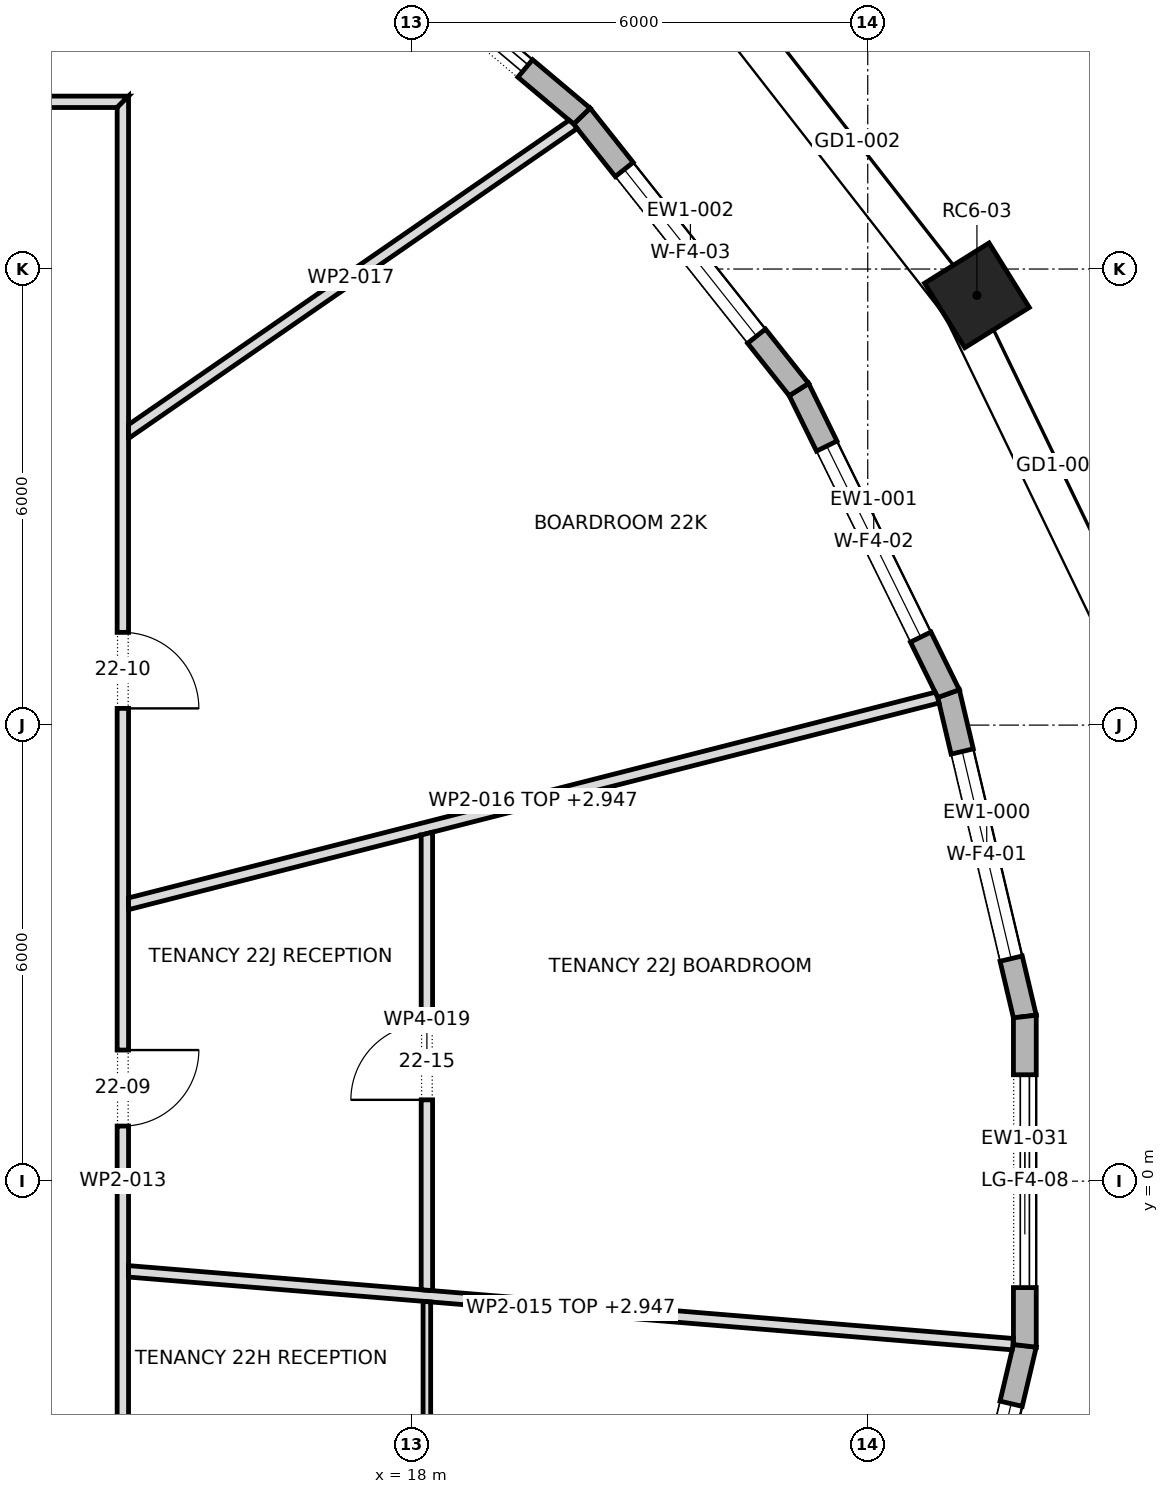
"""IFC4 building model, lengths in metres.
Left out: names, types, materials, properties, quantities, classifications, styles, units other than length and angle.
Written with IfcOpenShell. Run it as: python <this file> out.ifc"""

import sys

from ifc_helpers import new_model, si_unit, direction, frame, frame_2d, origin, origin_2d, place, context, subcontext, project, spatial, polyline, rectangle, outline, extrude, element, fill, save


model = new_model("IFC4")
c1 = context("Model", 3, precision=1e-05, world=origin(), true_north=direction((0.0, 1.0)))
c2 = subcontext(c1, "Body", "Model", "MODEL_VIEW")
j1 = project(units=[si_unit("LENGTHUNIT", "METRE"), si_unit("PLANEANGLEUNIT", "RADIAN")], contexts=[c1])
p1 = place(None, origin())
s1 = spatial("IfcSite", under=j1, at=p1, CompositionType="ELEMENT")
p2 = place(p1, origin())
s2 = spatial("IfcBuilding", under=s1, at=p2, CompositionType="ELEMENT")
p3 = place(p2, frame((0.0, 0.0, 304.3)))
s3 = spatial("IfcBuildingStorey", under=s2, at=p3, CompositionType="ELEMENT", Elevation=304.3)
p4 = place(p3, frame((25.437, 11.654, 0.0), z_axis=(0.0, 0.0, 1.0), x_axis=(-0.529150863019, 0.848527762755, 0.0)))
e1 = element("IfcColumn", 1, at=p4, inside=s3, PredefinedType="COLUMN", context=c2, shape_type="SweptSolid", body=[
    extrude(rectangle(XDim=1.0, YDim=1.0, at=origin_2d()), origin(), (0.0, 0.0, 1.0), 4.0),
])
p5 = place(p3, frame((26.067, 2.166, 0.0), z_axis=(0.0, 0.0, 1.0), x_axis=(-0.229974411334, 0.973196675977, 0.0)))
e2 = element("IfcWall", 2, at=p5, inside=s3, PredefinedType="STANDARD", context=c2, shape_type="SweptSolid", body=[
    extrude(outline(polyline([(-0.018, -0.15), (4.382, -0.15), (4.348, 0.15), (0.018, 0.15), (-0.018, -0.15)])), origin(), (0.0, 0.0, 1.0), 3.7),
])
p6 = place(p5, frame((0.783, 0.0, 0.6)))
e3 = element("IfcOpeningElement", 3, at=p6, cuts=e2, PredefinedType="OPENING", context=c2, shape_type="SweptSolid", body=[
    extrude(rectangle(XDim=2.8, YDim=2.65, at=frame_2d((1.4, 1.325))), frame((0.0, 0.162, 0.0), z_axis=(0.0, -1.0, 0.0), x_axis=(1.0, 0.0, 0.0)), (0.0, 0.0, 1.0), 0.324),
])
p7 = place(p3, frame((25.063, 6.415, 0.0), z_axis=(0.0, 0.0, 1.0), x_axis=(-0.441509050872, 0.897256796017, 0.0)))
e4 = element("IfcWall", 4, at=p7, inside=s3, PredefinedType="STANDARD", context=c2, shape_type="SweptSolid", body=[
    extrude(outline(polyline([(-0.017, -0.15), (4.474, -0.15), (4.442, 0.15), (0.017, 0.15), (-0.017, -0.15)])), origin(), (0.0, 0.0, 1.0), 3.7),
])
p8 = place(p7, frame((0.829, 0.0, 0.6)))
e5 = element("IfcOpeningElement", 5, at=p8, cuts=e4, PredefinedType="OPENING", context=c2, shape_type="SweptSolid", body=[
    extrude(rectangle(XDim=2.8, YDim=2.65, at=frame_2d((1.4, 1.325))), frame((0.0, 0.162, 0.0), z_axis=(0.0, -1.0, 0.0), x_axis=(1.0, 0.0, 0.0)), (0.0, 0.0, 1.0), 0.324),
])
p9 = place(p3, frame((23.094, 10.415, 0.0), z_axis=(0.0, 0.0, 1.0), x_axis=(-0.621682706372, 0.78326918272, 0.0)))
e6 = element("IfcWall", 6, at=p9, inside=s3, PredefinedType="STANDARD", context=c2, shape_type="SweptSolid", body=[
    extrude(outline(polyline([(-0.016, -0.15), (4.608, -0.15), (4.578, 0.15), (0.016, 0.15), (-0.016, -0.15)])), origin(), (0.0, 0.0, 1.0), 3.7),
])
p10 = place(p9, frame((0.896, 0.0, 0.6)))
e7 = element("IfcOpeningElement", 7, at=p10, cuts=e6, PredefinedType="OPENING", context=c2, shape_type="SweptSolid", body=[
    extrude(rectangle(XDim=2.8, YDim=2.65, at=frame_2d((1.4, 1.325))), frame((0.0, 0.162, 0.0), z_axis=(0.0, -1.0, 0.0), x_axis=(1.0, 0.0, 0.0)), (0.0, 0.0, 1.0), 0.324),
])
p11 = place(p3, frame((20.239, 14.012, 0.0), z_axis=(0.0, 0.0, 1.0), x_axis=(-0.765059193792, 0.643959959931, 0.0)))
e8 = element("IfcWall", 8, at=p11, inside=s3, PredefinedType="STANDARD", context=c2, shape_type="SweptSolid", body=[
    extrude(outline(polyline([(-0.015, -0.15), (4.762, -0.15), (4.734, 0.15), (0.015, 0.15), (-0.015, -0.15)])), origin(), (0.0, 0.0, 1.0), 3.7),
])
p12 = place(p11, frame((0.974, 0.0, 0.0)))
e9 = element("IfcOpeningElement", 9, at=p12, cuts=e8, PredefinedType="OPENING", context=c2, shape_type="SweptSolid", body=[
    extrude(rectangle(XDim=2.8, YDim=3.25, at=frame_2d((1.4, 1.625))), frame((0.0, 0.162, 0.0), z_axis=(0.0, -1.0, 0.0), x_axis=(1.0, 0.0, 0.0)), (0.0, 0.0, 1.0), 0.324),
])
p13 = place(p3, frame((25.063, -6.415, 0.0), z_axis=(0.0, 0.0, 1.0), x_axis=(0.229974411334, 0.973196675977, 0.0)))
e10 = element("IfcWall", 10, at=p13, inside=s3, PredefinedType="STANDARD", context=c2, shape_type="SweptSolid", body=[
    extrude(outline(polyline([(-0.017, -0.15), (4.383, -0.15), (4.348, 0.15), (0.017, 0.15), (-0.017, -0.15)])), origin(), (0.0, 0.0, 1.0), 3.7),
])
p14 = place(p13, frame((0.783, 0.0, 0.6)))
e11 = element("IfcOpeningElement", 11, at=p14, cuts=e10, PredefinedType="OPENING", context=c2, shape_type="SweptSolid", body=[
    extrude(rectangle(XDim=2.8, YDim=2.65, at=frame_2d((1.4, 1.325))), frame((0.0, 0.162, 0.0), z_axis=(0.0, -1.0, 0.0), x_axis=(1.0, 0.0, 0.0)), (0.0, 0.0, 1.0), 0.324),
])
p15 = place(p3, frame((26.067, -2.166, 0.0), z_axis=(0.0, 0.0, 1.0), x_axis=(0.0, 1.0, 0.0)))
e12 = element("IfcWall", 12, at=p15, inside=s3, PredefinedType="STANDARD", context=c2, shape_type="SweptSolid", body=[
    extrude(outline(polyline([(-0.018, -0.15), (4.35, -0.15), (4.315, 0.15), (0.018, 0.15), (-0.018, -0.15)])), origin(), (0.0, 0.0, 1.0), 3.7),
])
p16 = place(p15, frame((0.766, 0.0, 0.0)))
e13 = element("IfcOpeningElement", 13, at=p16, cuts=e12, PredefinedType="OPENING", context=c2, shape_type="SweptSolid", body=[
    extrude(rectangle(XDim=2.8, YDim=3.25, at=frame_2d((1.4, 1.625))), frame((0.0, 0.162, 0.0), z_axis=(0.0, -1.0, 0.0), x_axis=(1.0, 0.0, 0.0)), (0.0, 0.0, 1.0), 0.324),
])
p17 = place(p3, frame((-14.275, 14.2, 0.0), z_axis=(0.0, 0.0, 1.0), x_axis=(1.0, 0.0, 0.0)))
e14 = element("IfcWall", 14, at=p17, inside=s3, PredefinedType="PARTITIONING", context=c2, shape_type="SweptSolid", body=[
    extrude(outline(polyline([(0.15, -0.075), (2.033, -0.075), (3.917, -0.075), (5.8, -0.075), (7.683, -0.075), (9.567, -0.075), (11.45, -0.075), (13.333, -0.075), (15.217, -0.075), (17.1, -0.075), (18.983, -0.075), (20.866, -0.075), (22.75, -0.075), (24.633, -0.075), (26.517, -0.075), (28.4, -0.075), (28.55, 0.075), (28.55, 0.075), (26.646, 0.075), (24.743, 0.075), (22.84, 0.075), (20.937, 0.075), (19.033, 0.075), (17.13, 0.075), (15.227, 0.075), (13.323, 0.075), (11.42, 0.075), (9.517, 0.075), (7.613, 0.075), (5.71, 0.075), (3.807, 0.075), (1.903, 0.075), (0.0, 0.075), (0.15, -0.075)])), origin(), (0.0, 0.0, 1.0), 3.7),
])
p18 = place(p17, frame((20.045, 0.0, 0.0)))
e15 = element("IfcOpeningElement", 15, at=p18, cuts=e14, PredefinedType="OPENING", context=c2, shape_type="SweptSolid", body=[
    extrude(rectangle(XDim=1.0, YDim=2.1, at=frame_2d((0.5, 1.05))), frame((0.0, 0.087, 0.0), z_axis=(0.0, -1.0, 0.0), x_axis=(1.0, 0.0, 0.0)), (0.0, 0.0, 1.0), 0.174),
])
p19 = place(p17, frame((6.025, 0.0, 0.0)))
e16 = element("IfcOpeningElement", 16, at=p19, cuts=e14, PredefinedType="OPENING", context=c2, shape_type="SweptSolid", body=[
    extrude(rectangle(XDim=1.0, YDim=2.1, at=frame_2d((0.5, 1.05))), frame((0.0, 0.087, 0.0), z_axis=(0.0, -1.0, 0.0), x_axis=(1.0, 0.0, 0.0)), (0.0, 0.0, 1.0), 0.174),
])
p20 = place(p3, frame((14.2, -14.275, 0.0), z_axis=(0.0, 0.0, 1.0), x_axis=(0.0, 1.0, 0.0)))
e17 = element("IfcWall", 17, at=p20, inside=s3, PredefinedType="PARTITIONING", context=c2, shape_type="SweptSolid", body=[
    extrude(outline(polyline([(28.55, -0.075), (28.55, -0.075), (28.4, 0.075), (26.517, 0.075), (24.633, 0.075), (22.75, 0.075), (20.866, 0.075), (18.983, 0.075), (17.1, 0.075), (15.217, 0.075), (13.333, 0.075), (11.45, 0.075), (9.567, 0.075), (7.683, 0.075), (5.8, 0.075), (3.917, 0.075), (2.033, 0.075), (0.15, 0.075), (0.0, -0.075), (1.903, -0.075), (3.807, -0.075), (5.71, -0.075), (7.613, -0.075), (9.517, -0.075), (11.42, -0.075), (13.323, -0.075), (15.227, -0.075), (17.13, -0.075), (19.033, -0.075), (20.937, -0.075), (22.84, -0.075), (24.743, -0.075), (26.646, -0.075), (28.55, -0.075)])), origin(), (0.0, 0.0, 1.0), 3.7),
])
p21 = place(p20, frame((3.48, 0.0, 0.0)))
e18 = element("IfcOpeningElement", 18, at=p21, cuts=e17, PredefinedType="OPENING", context=c2, shape_type="SweptSolid", body=[
    extrude(rectangle(XDim=1.0, YDim=2.1, at=frame_2d((0.5, 1.05))), frame((0.0, 0.087, 0.0), z_axis=(0.0, -1.0, 0.0), x_axis=(1.0, 0.0, 0.0)), (0.0, 0.0, 1.0), 0.174),
])
p22 = place(p20, frame((9.99, 0.0, 0.0)))
e19 = element("IfcOpeningElement", 19, at=p22, cuts=e17, PredefinedType="OPENING", context=c2, shape_type="SweptSolid", body=[
    extrude(rectangle(XDim=1.0, YDim=2.1, at=frame_2d((0.5, 1.05))), frame((0.0, 0.087, 0.0), z_axis=(0.0, -1.0, 0.0), x_axis=(1.0, 0.0, 0.0)), (0.0, 0.0, 1.0), 0.174),
])
p23 = place(p20, frame((15.0, 0.0, 0.0)))
e20 = element("IfcOpeningElement", 20, at=p23, cuts=e17, PredefinedType="OPENING", context=c2, shape_type="SweptSolid", body=[
    extrude(rectangle(XDim=1.0, YDim=2.1, at=frame_2d((0.5, 1.05))), frame((0.0, 0.087, 0.0), z_axis=(0.0, -1.0, 0.0), x_axis=(1.0, 0.0, 0.0)), (0.0, 0.0, 1.0), 0.174),
])
p24 = place(p20, frame((20.495, 0.0, 0.0)))
e21 = element("IfcOpeningElement", 21, at=p24, cuts=e17, PredefinedType="OPENING", context=c2, shape_type="SweptSolid", body=[
    extrude(rectangle(XDim=1.0, YDim=2.1, at=frame_2d((0.5, 1.05))), frame((0.0, 0.087, 0.0), z_axis=(0.0, -1.0, 0.0), x_axis=(1.0, 0.0, 0.0)), (0.0, 0.0, 1.0), 0.174),
])
p25 = place(p3, frame((14.269, -1.186, 0.0), z_axis=(0.0, 0.0, 1.0), x_axis=(0.996625584757, -0.082081933503, 0.0)))
e22 = element("IfcWall", 22, at=p25, inside=s3, PredefinedType="PARTITIONING", context=c2, shape_type="SweptSolid", body=[
    extrude(outline(polyline([(0.012, -0.075), (1.956, -0.075), (3.9, -0.075), (5.844, -0.075), (7.788, -0.075), (9.732, -0.075), (11.676, -0.075), (11.68, -0.05), (11.68, 0.075), (9.733, 0.075), (7.787, 0.075), (5.84, 0.075), (3.893, 0.075), (1.947, 0.075), (0.0, 0.075), (0.0, 0.07), (0.012, -0.075)])), origin(), (0.0, 0.0, 1.0), 2.947),
])
p26 = place(p3, frame((14.257, 3.645, 0.0), z_axis=(0.0, 0.0, 1.0), x_axis=(0.968996414646, 0.247074783017, 0.0)))
e23 = element("IfcWall", 23, at=p26, inside=s3, PredefinedType="PARTITIONING", context=c2, shape_type="SweptSolid", body=[
    extrude(outline(polyline([(0.0, -0.075), (1.987, -0.075), (3.973, -0.075), (3.973, -0.073), (3.979, -0.075), (5.735, -0.075), (7.491, -0.075), (9.248, -0.075), (11.004, -0.075), (11.004, 0.008), (10.99, 0.075), (9.164, 0.075), (7.339, 0.075), (5.514, 0.075), (3.688, 0.075), (1.863, 0.075), (0.038, 0.075), (0.0, -0.074), (0.0, -0.075)])), origin(), (0.0, 0.0, 1.0), 2.947),
])
p27 = place(p3, frame((14.232, 9.833, 0.0), z_axis=(0.0, 0.0, 1.0), x_axis=(0.822725997435, 0.568438152436, 0.0)))
e24 = element("IfcWall", 24, at=p27, inside=s3, PredefinedType="PARTITIONING", context=c2, shape_type="SweptSolid", body=[
    extrude(outline(polyline([(0.0, -0.075), (1.793, -0.075), (3.587, -0.075), (5.38, -0.075), (7.174, -0.075), (7.169, -0.001), (7.148, 0.075), (5.387, 0.075), (3.626, 0.075), (1.865, 0.075), (0.104, 0.075), (0.0, -0.075), (0.0, -0.075)])), origin(), (0.0, 0.0, 1.0), 3.7),
])
p28 = place(p3, frame((18.2, -1.581, 0.0), z_axis=(0.0, 0.0, 1.0), x_axis=(0.0, -1.0, 0.0)))
e25 = element("IfcWall", 25, at=p28, inside=s3, PredefinedType="PARTITIONING", context=c2, shape_type="SweptSolid", body=[
    extrude(outline(polyline([(0.0, -0.05), (1.626, -0.05), (3.252, -0.05), (4.879, -0.05), (6.505, -0.05), (6.55, 0.05), (6.55, 0.05), (4.915, 0.05), (3.279, 0.05), (1.643, 0.05), (0.008, 0.05), (0.0, -0.044), (0.0, -0.05)])), origin(), (0.0, 0.0, 1.0), 3.7),
])
p29 = place(p28, frame((2.819, 0.0, 0.0)))
e26 = element("IfcOpeningElement", 26, at=p29, cuts=e25, PredefinedType="OPENING", context=c2, shape_type="SweptSolid", body=[
    extrude(rectangle(XDim=0.9, YDim=2.1, at=frame_2d((0.45, 1.05))), frame((0.0, 0.062, 0.0), z_axis=(0.0, -1.0, 0.0), x_axis=(1.0, 0.0, 0.0)), (0.0, 0.0, 1.0), 0.124),
])
p30 = place(p3, frame((18.2, 4.592, 0.0), z_axis=(0.0, 0.0, 1.0), x_axis=(0.0, -1.0, 0.0)))
e27 = element("IfcWall", 27, at=p30, inside=s3, PredefinedType="PARTITIONING", context=c2, shape_type="SweptSolid", body=[
    extrude(outline(polyline([(0.038, -0.075), (2.032, -0.075), (4.026, -0.075), (6.02, -0.075), (6.031, 0.07), (6.031, 0.075), (4.524, 0.075), (3.016, 0.075), (1.508, 0.075), (0.0, 0.075), (0.0, 0.074), (0.038, -0.075)])), origin(), (0.0, 0.0, 1.0), 3.7),
])
p31 = place(p30, frame((2.521, 0.0, 0.0)))
e28 = element("IfcOpeningElement", 28, at=p31, cuts=e27, PredefinedType="OPENING", context=c2, shape_type="SweptSolid", body=[
    extrude(rectangle(XDim=1.0, YDim=2.1, at=frame_2d((0.5, 1.05))), frame((0.0, 0.087, 0.0), z_axis=(0.0, -1.0, 0.0), x_axis=(1.0, 0.0, 0.0)), (0.0, 0.0, 1.0), 0.174),
])
p32 = place(p6, origin())
e29 = element("IfcWindow", 29, at=p32, inside=s3, PartitioningType="DOUBLE_PANEL_VERTICAL", PredefinedType="WINDOW", context=c2, shape_type="SweptSolid", body=[
    extrude(rectangle(XDim=2.8, YDim=2.65, at=frame_2d((1.4, 1.325))), frame((0.0, 0.03, 0.0), z_axis=(0.0, -1.0, 0.0), x_axis=(1.0, 0.0, 0.0)), (0.0, 0.0, 1.0), 0.06),
])
fill(e3, e29)
p33 = place(p8, origin())
e30 = element("IfcWindow", 30, at=p33, inside=s3, PartitioningType="DOUBLE_PANEL_VERTICAL", PredefinedType="WINDOW", context=c2, shape_type="SweptSolid", body=[
    extrude(rectangle(XDim=2.8, YDim=2.65, at=frame_2d((1.4, 1.325))), frame((0.0, 0.03, 0.0), z_axis=(0.0, -1.0, 0.0), x_axis=(1.0, 0.0, 0.0)), (0.0, 0.0, 1.0), 0.06),
])
fill(e5, e30)
p34 = place(p10, origin())
e31 = element("IfcWindow", 31, at=p34, inside=s3, PartitioningType="DOUBLE_PANEL_VERTICAL", PredefinedType="WINDOW", context=c2, shape_type="SweptSolid", body=[
    extrude(rectangle(XDim=2.8, YDim=2.65, at=frame_2d((1.4, 1.325))), frame((0.0, 0.03, 0.0), z_axis=(0.0, -1.0, 0.0), x_axis=(1.0, 0.0, 0.0)), (0.0, 0.0, 1.0), 0.06),
])
fill(e7, e31)
p35 = place(p12, origin())
e32 = element("IfcDoor", 32, at=p35, inside=s3, OperationType="DOUBLE_DOOR_SLIDING", PredefinedType="DOOR", context=c2, shape_type="SweptSolid", body=[
    extrude(rectangle(XDim=2.8, YDim=3.25, at=frame_2d((1.4, 1.625))), frame((0.0, 0.025, 0.0), z_axis=(0.0, -1.0, 0.0), x_axis=(1.0, 0.0, 0.0)), (0.0, 0.0, 1.0), 0.05),
])
fill(e9, e32)
p36 = place(p14, origin())
e33 = element("IfcWindow", 33, at=p36, inside=s3, PartitioningType="DOUBLE_PANEL_VERTICAL", PredefinedType="WINDOW", context=c2, shape_type="SweptSolid", body=[
    extrude(rectangle(XDim=2.8, YDim=2.65, at=frame_2d((1.4, 1.325))), frame((0.0, 0.03, 0.0), z_axis=(0.0, -1.0, 0.0), x_axis=(1.0, 0.0, 0.0)), (0.0, 0.0, 1.0), 0.06),
])
fill(e11, e33)
p37 = place(p16, origin())
e34 = element("IfcDoor", 34, at=p37, inside=s3, OperationType="DOUBLE_DOOR_SLIDING", PredefinedType="DOOR", context=c2, shape_type="SweptSolid", body=[
    extrude(rectangle(XDim=2.8, YDim=3.25, at=frame_2d((1.4, 1.625))), frame((0.0, 0.025, 0.0), z_axis=(0.0, -1.0, 0.0), x_axis=(1.0, 0.0, 0.0)), (0.0, 0.0, 1.0), 0.05),
])
fill(e13, e34)
p38 = place(p23, frame((1.0, 0.0, 0.0), z_axis=(0.0, 0.0, 1.0), x_axis=(-1.0, 0.0, 0.0)))
e35 = element("IfcDoor", 35, at=p38, inside=s3, OperationType="SINGLE_SWING_RIGHT", PredefinedType="DOOR", context=c2, shape_type="SweptSolid", body=[
    extrude(rectangle(XDim=1.0, YDim=2.1, at=frame_2d((0.5, 1.05))), frame((0.0, 0.025, 0.0), z_axis=(0.0, -1.0, 0.0), x_axis=(1.0, 0.0, 0.0)), (0.0, 0.0, 1.0), 0.05),
])
fill(e20, e35)
p39 = place(p24, frame((1.0, 0.0, 0.0), z_axis=(0.0, 0.0, 1.0), x_axis=(-1.0, 0.0, 0.0)))
e36 = element("IfcDoor", 36, at=p39, inside=s3, OperationType="SINGLE_SWING_LEFT", PredefinedType="DOOR", context=c2, shape_type="SweptSolid", body=[
    extrude(rectangle(XDim=1.0, YDim=2.1, at=frame_2d((0.5, 1.05))), frame((0.0, 0.025, 0.0), z_axis=(0.0, -1.0, 0.0), x_axis=(1.0, 0.0, 0.0)), (0.0, 0.0, 1.0), 0.05),
])
fill(e21, e36)
p40 = place(p31, frame((1.0, 0.0, 0.0), z_axis=(0.0, 0.0, 1.0), x_axis=(-1.0, 0.0, 0.0)))
e37 = element("IfcDoor", 37, at=p40, inside=s3, OperationType="SINGLE_SWING_RIGHT", PredefinedType="DOOR", context=c2, shape_type="SweptSolid", body=[
    extrude(rectangle(XDim=1.0, YDim=2.1, at=frame_2d((0.5, 1.05))), frame((0.0, 0.025, 0.0), z_axis=(0.0, -1.0, 0.0), x_axis=(1.0, 0.0, 0.0)), (0.0, 0.0, 1.0), 0.05),
])
fill(e28, e37)
save(model, sys.argv[1])
